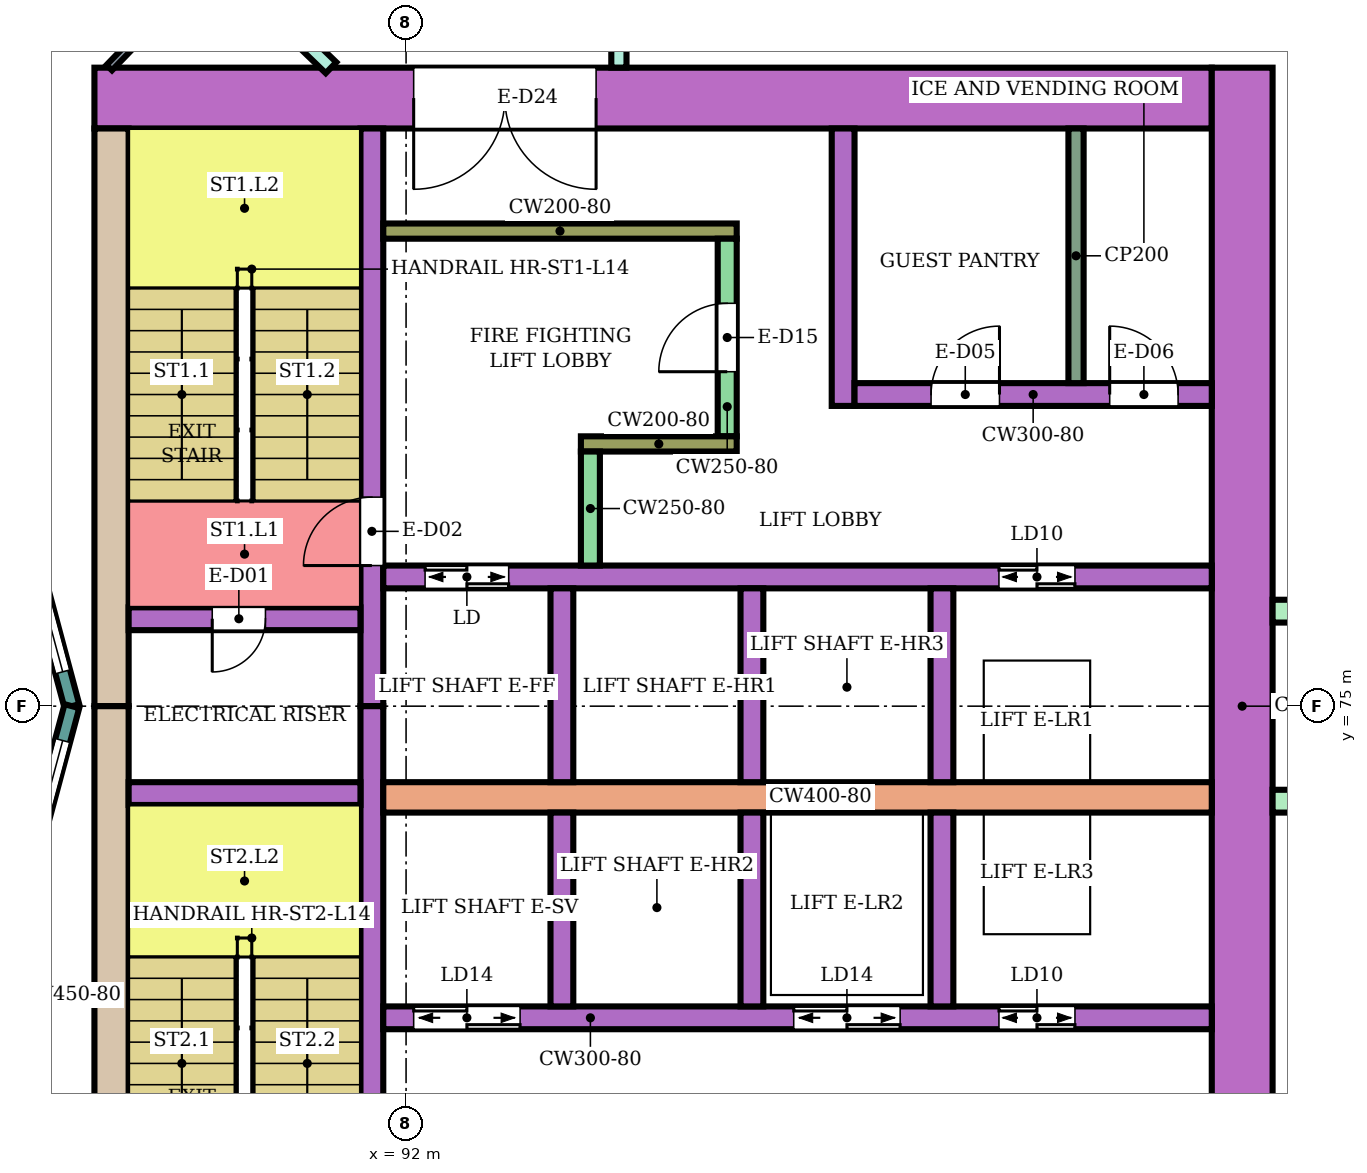
"""IFC4 building model, lengths in metres.
Left out: names, types, materials, properties, quantities, classifications, styles, units other than length and angle.
Written with IfcOpenShell. Run it as: python <this file> out.ifc"""

import sys

from ifc_helpers import new_model, si_unit, direction, frame, frame_2d, origin, place, context, subcontext, project, spatial, rectangle, extrude, element, fill, save


model = new_model("IFC4")
c1 = context("Model", 3, precision=1e-05, world=origin(), true_north=direction((0.0, 1.0)))
c2 = subcontext(c1, "Body", "Model", "MODEL_VIEW")
j1 = project(units=[si_unit("LENGTHUNIT", "METRE"), si_unit("PLANEANGLEUNIT", "RADIAN")], contexts=[c1])
p1 = place(None, origin())
s1 = spatial("IfcSite", under=j1, at=p1, CompositionType="ELEMENT")
p2 = place(p1, origin())
s2 = spatial("IfcBuilding", under=s1, at=p2, CompositionType="ELEMENT")
p3 = place(p2, frame((0.0, 0.0, 63.0)))
s3 = spatial("IfcBuildingStorey", under=s2, at=p3, CompositionType="ELEMENT", Elevation=63.0)
p4 = place(p3, frame((87.9, 83.0, 0.0), z_axis=(0.0, 0.0, 1.0), x_axis=(1.0, 0.0, 0.0)))
e1 = element("IfcWall", 1, at=p4, inside=s3, PredefinedType="SHEAR", context=c2, shape_type="SweptSolid", body=[
    extrude(rectangle(XDim=14.7, YDim=0.8, at=frame_2d((7.35, 0.0))), origin(), (0.0, 0.0, 1.0), 3.48),
])
p5 = place(p4, frame((4.2, 0.0, 0.0)))
e2 = element("IfcOpeningElement", 2, at=p5, cuts=e1, PredefinedType="OPENING", context=c2, shape_type="SweptSolid", body=[
    extrude(rectangle(XDim=2.4, YDim=2.4, at=frame_2d((1.2, 1.2))), frame((0.0, 0.41, 0.0), z_axis=(0.0, -1.0, 0.0), x_axis=(1.0, 0.0, 0.0)), (0.0, 0.0, 1.0), 0.82),
])
for number, where, z_axis, x_axis in (
    (3, (88.125, 75.0, 0.0), (0.0, 0.0, 1.0), (0.0, 1.0, 0.0)),
    (4, (88.125, 67.4, 0.0), (0.0, 0.0, 1.0), (0.0, 1.0, 0.0)),
):
    element("IfcWall", number, at=place(p3, frame(where, z_axis=z_axis, x_axis=x_axis)), inside=s3, PredefinedType="SHEAR", context=c2, shape_type="SweptSolid", body=[
        extrude(rectangle(XDim=7.6, YDim=0.45, at=frame_2d((3.8, 0.0))), origin(), (0.0, 0.0, 1.0), 3.48),
    ])
p6 = place(p3, frame((103.0, 66.6, 0.0), z_axis=(0.0, 0.0, 1.0), x_axis=(0.0, 1.0, 0.0)))
e5 = element("IfcWall", 5, at=p6, inside=s3, PredefinedType="SHEAR", context=c2, shape_type="SweptSolid", body=[
    extrude(rectangle(XDim=16.8, YDim=0.8, at=frame_2d((8.4, 0.0))), origin(), (0.0, 0.0, 1.0), 3.48),
])
p7 = place(p3, frame((91.55, 75.0, 0.0), z_axis=(0.0, 0.0, 1.0), x_axis=(0.0, 1.0, 0.0)))
e6 = element("IfcWall", 6, at=p7, inside=s3, PredefinedType="SHEAR", context=c2, shape_type="SweptSolid", body=[
    extrude(rectangle(XDim=7.6, YDim=0.3, at=frame_2d((3.8, 0.0))), origin(), (0.0, 0.0, 1.0), 3.48),
])
p8 = place(p7, frame((1.85, 0.0, 0.0)))
e7 = element("IfcOpeningElement", 7, at=p8, cuts=e6, PredefinedType="OPENING", context=c2, shape_type="SweptSolid", body=[
    extrude(rectangle(XDim=0.9, YDim=2.1, at=frame_2d((0.45, 1.05))), frame((0.0, 0.16, 0.0), z_axis=(0.0, -1.0, 0.0), x_axis=(1.0, 0.0, 0.0)), (0.0, 0.0, 1.0), 0.32),
])
p9 = place(p3, frame((91.55, 67.4, 0.0), z_axis=(0.0, 0.0, 1.0), x_axis=(0.0, 1.0, 0.0)))
e8 = element("IfcWall", 8, at=p9, inside=s3, PredefinedType="SHEAR", context=c2, shape_type="SweptSolid", body=[
    extrude(rectangle(XDim=7.6, YDim=0.3, at=frame_2d((3.8, 0.0))), origin(), (0.0, 0.0, 1.0), 3.48),
])
p10 = place(p9, frame((0.25, 0.0, 0.0)))
e9 = element("IfcOpeningElement", 9, at=p10, cuts=e8, PredefinedType="OPENING", context=c2, shape_type="SweptSolid", body=[
    extrude(rectangle(XDim=0.9, YDim=2.1, at=frame_2d((0.45, 1.05))), frame((0.0, 0.16, 0.0), z_axis=(0.0, -1.0, 0.0), x_axis=(1.0, 0.0, 0.0)), (0.0, 0.0, 1.0), 0.32),
])
p11 = place(p3, frame((88.35, 76.15, 0.0), z_axis=(0.0, 0.0, 1.0), x_axis=(1.0, 0.0, 0.0)))
e10 = element("IfcWall", 10, at=p11, inside=s3, PredefinedType="SHEAR", context=c2, shape_type="SweptSolid", body=[
    extrude(rectangle(XDim=3.05, YDim=0.3, at=frame_2d((1.525, 0.0))), origin(), (0.0, 0.0, 1.0), 3.48),
])
p12 = place(p11, frame((1.1, 0.0, 0.0)))
e11 = element("IfcOpeningElement", 11, at=p12, cuts=e10, PredefinedType="OPENING", context=c2, shape_type="SweptSolid", body=[
    extrude(rectangle(XDim=0.7, YDim=2.0, at=frame_2d((0.35, 1.0))), frame((0.0, 0.16, 0.0), z_axis=(0.0, -1.0, 0.0), x_axis=(1.0, 0.0, 0.0)), (0.0, 0.0, 1.0), 0.32),
])
p13 = place(p3, frame((88.35, 73.85, 0.0), z_axis=(0.0, 0.0, 1.0), x_axis=(1.0, 0.0, 0.0)))
e12 = element("IfcWall", 12, at=p13, inside=s3, PredefinedType="SHEAR", context=c2, shape_type="SweptSolid", body=[
    extrude(rectangle(XDim=3.05, YDim=0.3, at=frame_2d((1.525, 0.0))), origin(), (0.0, 0.0, 1.0), 3.48),
])
p14 = place(p3, frame((91.7, 76.7, 0.0), z_axis=(0.0, 0.0, 1.0), x_axis=(1.0, 0.0, 0.0)))
e13 = element("IfcWall", 13, at=p14, inside=s3, PredefinedType="SHEAR", context=c2, shape_type="SweptSolid", body=[
    extrude(rectangle(XDim=10.9, YDim=0.3, at=frame_2d((5.45, 0.0))), origin(), (0.0, 0.0, 1.0), 3.48),
])
p15 = place(p14, frame((0.55, 0.0, 0.0)))
e14 = element("IfcOpeningElement", 14, at=p15, cuts=e13, PredefinedType="OPENING", context=c2, shape_type="SweptSolid", body=[
    extrude(rectangle(XDim=1.1, YDim=2.1, at=frame_2d((0.55, 1.05))), frame((0.0, 0.16, 0.0), z_axis=(0.0, -1.0, 0.0), x_axis=(1.0, 0.0, 0.0)), (0.0, 0.0, 1.0), 0.32),
])
p16 = place(p14, frame((8.1, 0.0, 0.0)))
e15 = element("IfcOpeningElement", 15, at=p16, cuts=e13, PredefinedType="OPENING", context=c2, shape_type="SweptSolid", body=[
    extrude(rectangle(XDim=1.0, YDim=2.1, at=frame_2d((0.5, 1.05))), frame((0.0, 0.16, 0.0), z_axis=(0.0, -1.0, 0.0), x_axis=(1.0, 0.0, 0.0)), (0.0, 0.0, 1.0), 0.32),
])
p17 = place(p3, frame((91.7, 73.8, 0.0), z_axis=(0.0, 0.0, 1.0), x_axis=(1.0, 0.0, 0.0)))
e16 = element("IfcWall", 16, at=p17, inside=s3, PredefinedType="SHEAR", context=c2, shape_type="SweptSolid", body=[
    extrude(rectangle(XDim=10.9, YDim=0.4, at=frame_2d((5.45, 0.0))), origin(), (0.0, 0.0, 1.0), 3.48),
])
p18 = place(p3, frame((91.7, 70.9, 0.0), z_axis=(0.0, 0.0, 1.0), x_axis=(1.0, 0.0, 0.0)))
e17 = element("IfcWall", 17, at=p18, inside=s3, PredefinedType="SHEAR", context=c2, shape_type="SweptSolid", body=[
    extrude(rectangle(XDim=10.9, YDim=0.3, at=frame_2d((5.45, 0.0))), origin(), (0.0, 0.0, 1.0), 3.48),
])
p19 = place(p18, frame((0.4, 0.0, 0.0)))
e18 = element("IfcOpeningElement", 18, at=p19, cuts=e17, PredefinedType="OPENING", context=c2, shape_type="SweptSolid", body=[
    extrude(rectangle(XDim=1.4, YDim=2.1, at=frame_2d((0.7, 1.05))), frame((0.0, 0.16, 0.0), z_axis=(0.0, -1.0, 0.0), x_axis=(1.0, 0.0, 0.0)), (0.0, 0.0, 1.0), 0.32),
])
p20 = place(p18, frame((5.4, 0.0, 0.0)))
e19 = element("IfcOpeningElement", 19, at=p20, cuts=e17, PredefinedType="OPENING", context=c2, shape_type="SweptSolid", body=[
    extrude(rectangle(XDim=1.4, YDim=2.1, at=frame_2d((0.7, 1.05))), frame((0.0, 0.16, 0.0), z_axis=(0.0, -1.0, 0.0), x_axis=(1.0, 0.0, 0.0)), (0.0, 0.0, 1.0), 0.32),
])
p21 = place(p18, frame((8.1, 0.0, 0.0)))
e20 = element("IfcOpeningElement", 20, at=p21, cuts=e17, PredefinedType="OPENING", context=c2, shape_type="SweptSolid", body=[
    extrude(rectangle(XDim=1.0, YDim=2.1, at=frame_2d((0.5, 1.05))), frame((0.0, 0.16, 0.0), z_axis=(0.0, -1.0, 0.0), x_axis=(1.0, 0.0, 0.0)), (0.0, 0.0, 1.0), 0.32),
])
for number, where, z_axis, x_axis in (
    (21, (94.05, 74.0, 0.0), (0.0, 0.0, 1.0), (0.0, 1.0, 0.0)),
    (22, (96.55, 74.0, 0.0), (0.0, 0.0, 1.0), (0.0, 1.0, 0.0)),
    (23, (99.05, 74.0, 0.0), (0.0, 0.0, 1.0), (0.0, 1.0, 0.0)),
    (24, (94.05, 71.05, 0.0), (0.0, 0.0, 1.0), (0.0, 1.0, 0.0)),
    (25, (96.55, 71.05, 0.0), (0.0, 0.0, 1.0), (0.0, 1.0, 0.0)),
    (26, (99.05, 71.05, 0.0), (0.0, 0.0, 1.0), (0.0, 1.0, 0.0)),
):
    element("IfcWall", number, at=place(p3, frame(where, z_axis=z_axis, x_axis=x_axis)), inside=s3, PredefinedType="SHEAR", context=c2, shape_type="SweptSolid", body=[
        extrude(rectangle(XDim=2.55, YDim=0.3, at=frame_2d((1.275, 0.0))), origin(), (0.0, 0.0, 1.0), 3.48),
    ])
p22 = place(p3, frame((91.7, 81.25, 0.0), z_axis=(0.0, 0.0, 1.0), x_axis=(1.0, 0.0, 0.0)))
e27 = element("IfcWall", 27, at=p22, inside=s3, PredefinedType="SHEAR", context=c2, shape_type="SweptSolid", body=[
    extrude(rectangle(XDim=4.65, YDim=0.2, at=frame_2d((2.325, 0.0))), origin(), (0.0, 0.0, 1.0), 3.48),
])
p23 = place(p3, frame((96.225, 78.55, 0.0), z_axis=(0.0, 0.0, 1.0), x_axis=(0.0, 1.0, 0.0)))
e28 = element("IfcWall", 28, at=p23, inside=s3, PredefinedType="SHEAR", context=c2, shape_type="SweptSolid", body=[
    extrude(rectangle(XDim=2.6, YDim=0.25, at=frame_2d((1.3, 0.0))), origin(), (0.0, 0.0, 1.0), 3.48),
])
p24 = place(p23, frame((0.85, 0.0, 0.0)))
e29 = element("IfcOpeningElement", 29, at=p24, cuts=e28, PredefinedType="OPENING", context=c2, shape_type="SweptSolid", body=[
    extrude(rectangle(XDim=0.9, YDim=2.1, at=frame_2d((0.45, 1.05))), frame((0.0, 0.135, 0.0), z_axis=(0.0, -1.0, 0.0), x_axis=(1.0, 0.0, 0.0)), (0.0, 0.0, 1.0), 0.27),
])
p25 = place(p3, frame((94.3, 78.45, 0.0), z_axis=(0.0, 0.0, 1.0), x_axis=(1.0, 0.0, 0.0)))
e30 = element("IfcWall", 30, at=p25, inside=s3, PredefinedType="SHEAR", context=c2, shape_type="SweptSolid", body=[
    extrude(rectangle(XDim=2.05, YDim=0.2, at=frame_2d((1.025, 0.0))), origin(), (0.0, 0.0, 1.0), 3.48),
])
p26 = place(p3, frame((94.425, 76.85, 0.0), z_axis=(0.0, 0.0, 1.0), x_axis=(0.0, 1.0, 0.0)))
e31 = element("IfcWall", 31, at=p26, inside=s3, PredefinedType="SHEAR", context=c2, shape_type="SweptSolid", body=[
    extrude(rectangle(XDim=1.5, YDim=0.25, at=frame_2d((0.75, 0.0))), origin(), (0.0, 0.0, 1.0), 3.48),
])
p27 = place(p3, frame((97.75, 78.95, 0.0), z_axis=(0.0, 0.0, 1.0), x_axis=(0.0, 1.0, 0.0)))
e32 = element("IfcWall", 32, at=p27, inside=s3, PredefinedType="SHEAR", context=c2, shape_type="SweptSolid", body=[
    extrude(rectangle(XDim=3.65, YDim=0.3, at=frame_2d((1.825, 0.0))), origin(), (0.0, 0.0, 1.0), 3.48),
])
p28 = place(p3, frame((97.9, 79.1, 0.0), z_axis=(0.0, 0.0, 1.0), x_axis=(1.0, 0.0, 0.0)))
e33 = element("IfcWall", 33, at=p28, inside=s3, PredefinedType="SHEAR", context=c2, shape_type="SweptSolid", body=[
    extrude(rectangle(XDim=4.7, YDim=0.3, at=frame_2d((2.35, 0.0))), origin(), (0.0, 0.0, 1.0), 3.48),
])
p29 = place(p28, frame((1.007, 0.0, 0.0)))
e34 = element("IfcOpeningElement", 34, at=p29, cuts=e33, PredefinedType="OPENING", context=c2, shape_type="SweptSolid", body=[
    extrude(rectangle(XDim=0.9, YDim=2.1, at=frame_2d((0.45, 1.05))), frame((0.0, 0.16, 0.0), z_axis=(0.0, -1.0, 0.0), x_axis=(1.0, 0.0, 0.0)), (0.0, 0.0, 1.0), 0.32),
])
p30 = place(p28, frame((3.357, 0.0, 0.0)))
e35 = element("IfcOpeningElement", 35, at=p30, cuts=e33, PredefinedType="OPENING", context=c2, shape_type="SweptSolid", body=[
    extrude(rectangle(XDim=0.9, YDim=2.1, at=frame_2d((0.45, 1.05))), frame((0.0, 0.16, 0.0), z_axis=(0.0, -1.0, 0.0), x_axis=(1.0, 0.0, 0.0)), (0.0, 0.0, 1.0), 0.32),
])
for number, where, z_axis, x_axis in (
    (36, (103.4, 73.75, 0.0), (0.0, 0.0, 1.0), (1.0, 0.0, 0.0)),
    (37, (103.4, 76.25, 0.0), (0.0, 0.0, 1.0), (1.0, 0.0, 0.0)),
):
    element("IfcWall", number, at=place(p3, frame(where, z_axis=z_axis, x_axis=x_axis)), inside=s3, PredefinedType="NOTDEFINED", context=c2, shape_type="SweptSolid", body=[
        extrude(rectangle(XDim=2.416, YDim=0.3, at=frame_2d((1.208, 0.0))), origin(), (0.0, 0.0, 1.0), 3.8),
    ])
p31 = place(p3, frame((87.604, 75.0, 0.0), z_axis=(0.0, 0.0, 1.0), x_axis=(-0.258789828301, 0.965933654434, 0.0)))
e38 = element("IfcWall", 38, at=p31, inside=s3, PredefinedType="NOTDEFINED", context=c2, shape_type="SweptSolid", body=[
    extrude(rectangle(XDim=3.936, YDim=0.2, at=frame_2d((1.968, 0.0))), origin(), (0.0, 0.0, 1.0), 3.8),
])
p32 = place(p31, frame((0.468, 0.0, 0.9)))
e39 = element("IfcOpeningElement", 39, at=p32, cuts=e38, PredefinedType="OPENING", context=c2, shape_type="SweptSolid", body=[
    extrude(rectangle(XDim=3.0, YDim=2.3, at=frame_2d((1.5, 1.15))), frame((0.0, 0.11, 0.0), z_axis=(0.0, -1.0, 0.0), x_axis=(1.0, 0.0, 0.0)), (0.0, 0.0, 1.0), 0.22),
])
p33 = place(p3, frame((86.585, 71.198, 0.0), z_axis=(0.0, 0.0, 1.0), x_axis=(0.258789828301, 0.965933654434, 0.0)))
e40 = element("IfcWall", 40, at=p33, inside=s3, PredefinedType="NOTDEFINED", context=c2, shape_type="SweptSolid", body=[
    extrude(rectangle(XDim=3.936, YDim=0.2, at=frame_2d((1.968, 0.0))), origin(), (0.0, 0.0, 1.0), 3.8),
])
p34 = place(p33, frame((0.468, 0.0, 0.9)))
e41 = element("IfcOpeningElement", 41, at=p34, cuts=e40, PredefinedType="OPENING", context=c2, shape_type="SweptSolid", body=[
    extrude(rectangle(XDim=3.0, YDim=2.3, at=frame_2d((1.5, 1.15))), frame((0.0, 0.11, 0.0), z_axis=(0.0, -1.0, 0.0), x_axis=(1.0, 0.0, 0.0)), (0.0, 0.0, 1.0), 0.22),
])
p35 = place(p3, frame((87.064, 87.211, 0.0), z_axis=(0.0, 0.0, 1.0), x_axis=(0.719540958932, -0.694450004262, 0.0)))
e42 = element("IfcWall", 42, at=p35, inside=s3, PredefinedType="PARTITIONING", context=c2, shape_type="SweptSolid", body=[
    extrude(rectangle(XDim=5.488, YDim=0.2, at=frame_2d((2.744, 0.0))), origin(), (0.0, 0.0, 1.0), 3.35),
])
p36 = place(p35, frame((0.55, 0.0, 0.0)))
e43 = element("IfcOpeningElement", 43, at=p36, cuts=e42, PredefinedType="OPENING", context=c2, shape_type="SweptSolid", body=[
    extrude(rectangle(XDim=1.0, YDim=2.1, at=frame_2d((0.5, 1.05))), frame((0.0, 0.11, 0.0), z_axis=(0.0, -1.0, 0.0), x_axis=(1.0, 0.0, 0.0)), (0.0, 0.0, 1.0), 0.22),
])
p37 = place(p3, frame((94.8, 83.401, 0.0), z_axis=(0.0, 0.0, 1.0), x_axis=(0.0, 1.0, 0.0)))
e44 = element("IfcWall", 44, at=p37, inside=s3, PredefinedType="PARTITIONING", context=c2, shape_type="SweptSolid", body=[
    extrude(rectangle(XDim=1.499, YDim=0.2, at=frame_2d((0.75, 0.0))), origin(), (0.0, 0.0, 1.0), 3.35),
])
p38 = place(p3, frame((88.095, 83.4, 0.0), z_axis=(0.0, 0.0, 1.0), x_axis=(0.694447472534, 0.719543402368, 0.0)))
e45 = element("IfcWall", 45, at=p38, inside=s3, PredefinedType="PARTITIONING", context=c2, shape_type="SweptSolid", body=[
    extrude(rectangle(XDim=1.926, YDim=0.1, at=frame_2d((0.963, 0.0))), origin(), (0.0, 0.0, 1.0), 3.35),
])
p39 = place(p38, frame((0.613, 0.0, 0.0)))
e46 = element("IfcOpeningElement", 46, at=p39, cuts=e45, PredefinedType="OPENING", context=c2, shape_type="SweptSolid", body=[
    extrude(rectangle(XDim=0.8, YDim=2.1, at=frame_2d((0.4, 1.05))), frame((0.0, 0.06, 0.0), z_axis=(0.0, -1.0, 0.0), x_axis=(1.0, 0.0, 0.0)), (0.0, 0.0, 1.0), 0.12),
])
p40 = place(p3, frame((100.814, 79.25, 0.0), z_axis=(0.0, 0.0, 1.0), x_axis=(0.0, 1.0, 0.0)))
e47 = element("IfcWall", 47, at=p40, inside=s3, PredefinedType="PARTITIONING", context=c2, shape_type="SweptSolid", body=[
    extrude(rectangle(XDim=3.35, YDim=0.2, at=frame_2d((1.675, 0.0))), origin(), (0.0, 0.0, 1.0), 3.48),
])
p41 = place(p32, origin())
e48 = element("IfcWindow", 48, at=p41, inside=s3, PartitioningType="SINGLE_PANEL", PredefinedType="WINDOW", context=c2, shape_type="SweptSolid", body=[
    extrude(rectangle(XDim=3.0, YDim=2.3, at=frame_2d((1.5, 1.15))), frame((0.0, 0.03, 0.0), z_axis=(0.0, -1.0, 0.0), x_axis=(1.0, 0.0, 0.0)), (0.0, 0.0, 1.0), 0.06),
])
fill(e39, e48)
p42 = place(p34, origin())
e49 = element("IfcWindow", 49, at=p42, inside=s3, PartitioningType="SINGLE_PANEL", PredefinedType="WINDOW", context=c2, shape_type="SweptSolid", body=[
    extrude(rectangle(XDim=3.0, YDim=2.3, at=frame_2d((1.5, 1.15))), frame((0.0, 0.03, 0.0), z_axis=(0.0, -1.0, 0.0), x_axis=(1.0, 0.0, 0.0)), (0.0, 0.0, 1.0), 0.06),
])
fill(e41, e49)
p43 = place(p12, frame((0.7, 0.0, 0.0), z_axis=(0.0, 0.0, 1.0), x_axis=(-1.0, 0.0, 0.0)))
e50 = element("IfcDoor", 50, at=p43, inside=s3, OperationType="SINGLE_SWING_RIGHT", PredefinedType="DOOR", context=c2, shape_type="SweptSolid", body=[
    extrude(rectangle(XDim=0.7, YDim=2.0, at=frame_2d((0.35, 1.0))), frame((0.0, 0.025, 0.0), z_axis=(0.0, -1.0, 0.0), x_axis=(1.0, 0.0, 0.0)), (0.0, 0.0, 1.0), 0.05),
])
fill(e11, e50)
p44 = place(p8, origin())
e51 = element("IfcDoor", 51, at=p44, inside=s3, OperationType="SINGLE_SWING_LEFT", PredefinedType="DOOR", context=c2, shape_type="SweptSolid", body=[
    extrude(rectangle(XDim=0.9, YDim=2.1, at=frame_2d((0.45, 1.05))), frame((0.0, 0.025, 0.0), z_axis=(0.0, -1.0, 0.0), x_axis=(1.0, 0.0, 0.0)), (0.0, 0.0, 1.0), 0.05),
])
fill(e7, e51)
p45 = place(p15, origin())
e52 = element("IfcDoor", 52, at=p45, inside=s3, OperationType="DOUBLE_DOOR_SLIDING", PredefinedType="DOOR", context=c2, shape_type="SweptSolid", body=[
    extrude(rectangle(XDim=1.1, YDim=2.1, at=frame_2d((0.55, 1.05))), frame((0.0, 0.025, 0.0), z_axis=(0.0, -1.0, 0.0), x_axis=(1.0, 0.0, 0.0)), (0.0, 0.0, 1.0), 0.05),
])
fill(e14, e52)
p46 = place(p16, origin())
e53 = element("IfcDoor", 53, at=p46, inside=s3, OperationType="DOUBLE_DOOR_SLIDING", PredefinedType="DOOR", context=c2, shape_type="SweptSolid", body=[
    extrude(rectangle(XDim=1.0, YDim=2.1, at=frame_2d((0.5, 1.05))), frame((0.0, 0.025, 0.0), z_axis=(0.0, -1.0, 0.0), x_axis=(1.0, 0.0, 0.0)), (0.0, 0.0, 1.0), 0.05),
])
fill(e15, e53)
p47 = place(p19, origin())
e54 = element("IfcDoor", 54, at=p47, inside=s3, OperationType="DOUBLE_DOOR_SLIDING", PredefinedType="DOOR", context=c2, shape_type="SweptSolid", body=[
    extrude(rectangle(XDim=1.4, YDim=2.1, at=frame_2d((0.7, 1.05))), frame((0.0, 0.025, 0.0), z_axis=(0.0, -1.0, 0.0), x_axis=(1.0, 0.0, 0.0)), (0.0, 0.0, 1.0), 0.05),
])
fill(e18, e54)
p48 = place(p20, origin())
e55 = element("IfcDoor", 55, at=p48, inside=s3, OperationType="DOUBLE_DOOR_SLIDING", PredefinedType="DOOR", context=c2, shape_type="SweptSolid", body=[
    extrude(rectangle(XDim=1.4, YDim=2.1, at=frame_2d((0.7, 1.05))), frame((0.0, 0.025, 0.0), z_axis=(0.0, -1.0, 0.0), x_axis=(1.0, 0.0, 0.0)), (0.0, 0.0, 1.0), 0.05),
])
fill(e19, e55)
p49 = place(p21, origin())
e56 = element("IfcDoor", 56, at=p49, inside=s3, OperationType="DOUBLE_DOOR_SLIDING", PredefinedType="DOOR", context=c2, shape_type="SweptSolid", body=[
    extrude(rectangle(XDim=1.0, YDim=2.1, at=frame_2d((0.5, 1.05))), frame((0.0, 0.025, 0.0), z_axis=(0.0, -1.0, 0.0), x_axis=(1.0, 0.0, 0.0)), (0.0, 0.0, 1.0), 0.05),
])
fill(e20, e56)
p50 = place(p24, origin())
e57 = element("IfcDoor", 57, at=p50, inside=s3, OperationType="SINGLE_SWING_LEFT", PredefinedType="DOOR", context=c2, shape_type="SweptSolid", body=[
    extrude(rectangle(XDim=0.9, YDim=2.1, at=frame_2d((0.45, 1.05))), frame((0.0, 0.025, 0.0), z_axis=(0.0, -1.0, 0.0), x_axis=(1.0, 0.0, 0.0)), (0.0, 0.0, 1.0), 0.05),
])
fill(e29, e57)
p51 = place(p29, origin())
e58 = element("IfcDoor", 58, at=p51, inside=s3, OperationType="SINGLE_SWING_RIGHT", PredefinedType="DOOR", context=c2, shape_type="SweptSolid", body=[
    extrude(rectangle(XDim=0.9, YDim=2.1, at=frame_2d((0.45, 1.05))), frame((0.0, 0.025, 0.0), z_axis=(0.0, -1.0, 0.0), x_axis=(1.0, 0.0, 0.0)), (0.0, 0.0, 1.0), 0.05),
])
fill(e34, e58)
p52 = place(p30, origin())
e59 = element("IfcDoor", 59, at=p52, inside=s3, OperationType="SINGLE_SWING_LEFT", PredefinedType="DOOR", context=c2, shape_type="SweptSolid", body=[
    extrude(rectangle(XDim=0.9, YDim=2.1, at=frame_2d((0.45, 1.05))), frame((0.0, 0.025, 0.0), z_axis=(0.0, -1.0, 0.0), x_axis=(1.0, 0.0, 0.0)), (0.0, 0.0, 1.0), 0.05),
])
fill(e35, e59)
p53 = place(p5, frame((2.4, 0.0, 0.0), z_axis=(0.0, 0.0, 1.0), x_axis=(-1.0, 0.0, 0.0)))
e60 = element("IfcDoor", 60, at=p53, inside=s3, OperationType="DOUBLE_DOOR_SINGLE_SWING", PredefinedType="DOOR", context=c2, shape_type="SweptSolid", body=[
    extrude(rectangle(XDim=2.4, YDim=2.4, at=frame_2d((1.2, 1.2))), frame((0.0, 0.025, 0.0), z_axis=(0.0, -1.0, 0.0), x_axis=(1.0, 0.0, 0.0)), (0.0, 0.0, 1.0), 0.05),
])
fill(e2, e60)
save(model, sys.argv[1])
